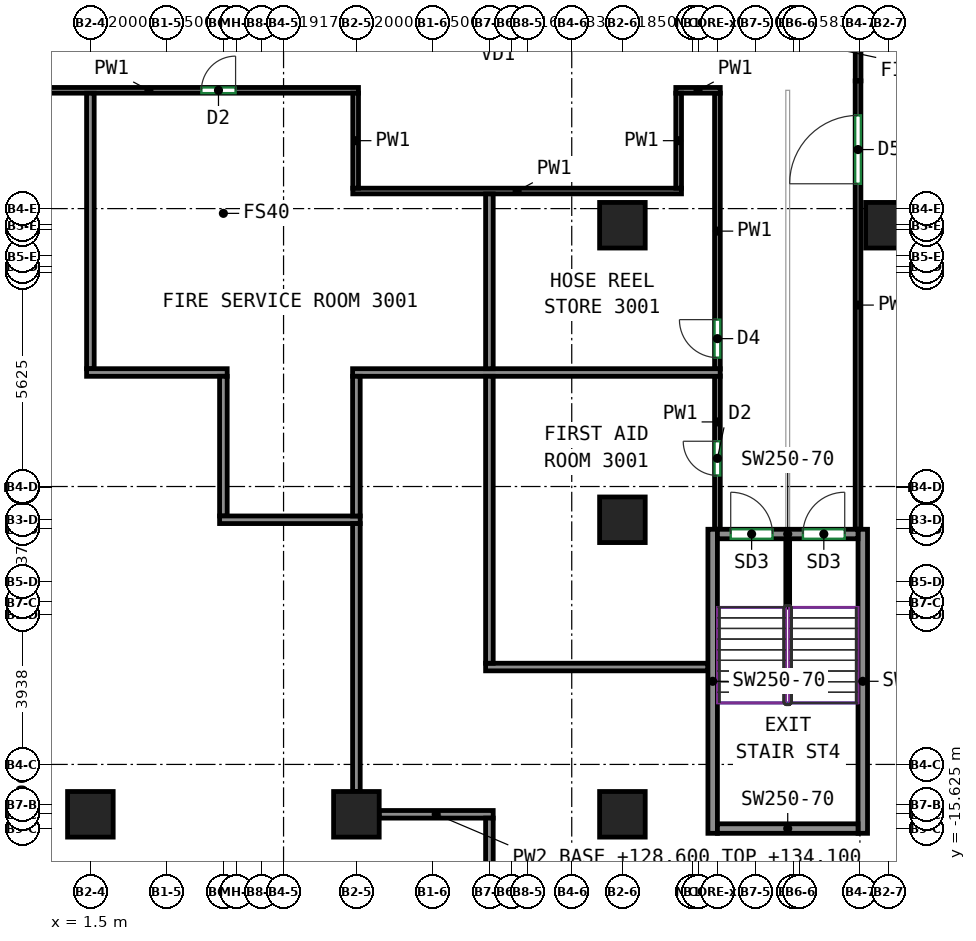
"""IFC4 building model, lengths in metres.
Left out: names, types, materials, properties, quantities, classifications, styles, units other than length and angle.
Written with IfcOpenShell. Run it as: python <this file> out.ifc"""

import sys

from ifc_helpers import new_model, si_unit, direction, frame, frame_2d, origin, origin_2d, place, context, subcontext, project, spatial, rectangle, extrude, source, transform, mapped, element, fill, save


model = new_model("IFC4")
c1 = context("Model", 3, precision=1e-05, world=origin(), true_north=direction((0.0, 1.0)))
c2 = subcontext(c1, "Body", "Model", "MODEL_VIEW")
j1 = project(units=[si_unit("LENGTHUNIT", "METRE"), si_unit("PLANEANGLEUNIT", "RADIAN")], contexts=[c1])
p1 = place(None, origin())
s1 = spatial("IfcSite", under=j1, at=p1, CompositionType="ELEMENT")
p2 = place(p1, origin())
s2 = spatial("IfcBuilding", under=s1, at=p2, CompositionType="ELEMENT")
p3 = place(p2, frame((0.0, 0.0, 128.6)))
s3 = spatial("IfcBuildingStorey", under=s2, at=p3, CompositionType="ELEMENT", Elevation=128.6)
m1 = source(origin(), c2, "Body", "SweptSolid", [
    extrude(rectangle(XDim=1.2, YDim=1.2, at=origin_2d()), origin(), (0.0, 0.0, 1.0), 5.5),
])
for number, where, z_axis, x_axis in (
    (1, (1.5, -15.25, 0.0), (0.0, 0.0, 1.0), (1.0, 0.0, 0.0)),
    (2, (8.5, -15.25, 0.0), (0.0, 0.0, 1.0), (1.0, 0.0, 0.0)),
    (3, (15.5, -15.25, 0.0), (0.0, 0.0, 1.0), (1.0, 0.0, 0.0)),
):
    element("IfcColumn", number, at=place(p3, frame(where, z_axis=z_axis, x_axis=x_axis)), inside=s3, PredefinedType="COLUMN", context=c2, shape_type="MappedRepresentation", body=[
        mapped(m1, transform((0.0, 0.0, 0.0))),
    ])
m2 = source(origin(), c2, "Body", "SweptSolid", [
    extrude(rectangle(XDim=1.2, YDim=1.2, at=origin_2d()), origin(), (0.0, 0.0, 1.0), 9.5),
])
p4 = place(p3, frame((15.5, -7.5, 0.0), z_axis=(0.0, 0.0, 1.0), x_axis=(1.0, 0.0, 0.0)))
e4 = element("IfcColumn", 4, at=p4, inside=s3, PredefinedType="COLUMN", context=c2, shape_type="MappedRepresentation", body=[
    mapped(m2, transform((0.0, 0.0, 0.0))),
])
for number, where, z_axis, x_axis in (
    (5, (15.5, 0.25, 0.0), (0.0, 0.0, 1.0), (1.0, 0.0, 0.0)),
    (6, (22.5, 0.25, 0.0), (0.0, 0.0, 1.0), (1.0, 0.0, 0.0)),
):
    element("IfcColumn", number, at=place(p3, frame(where, z_axis=z_axis, x_axis=x_axis)), inside=s3, PredefinedType="COLUMN", context=c2, shape_type="MappedRepresentation", body=[
        mapped(m1, transform((0.0, 0.0, 0.0))),
    ])
m3 = source(origin(), c2, "Body", "SweptSolid", [
    extrude(rectangle(XDim=8.0, YDim=0.25, at=frame_2d((4.0, 0.0))), origin(), (0.0, 0.0, 1.0), 9.5),
])
for number, where, z_axis, x_axis in (
    (7, (17.875, -15.75, 0.0), (0.0, 0.0, 1.0), (0.0, 1.0, 0.0)),
    (8, (21.825, -15.75, 0.0), (0.0, 0.0, 1.0), (0.0, 1.0, 0.0)),
):
    element("IfcWall", number, at=place(p3, frame(where, z_axis=z_axis, x_axis=x_axis)), inside=s3, PredefinedType="SHEAR", context=c2, shape_type="MappedRepresentation", body=[
        mapped(m3, transform((0.0, 0.0, 0.0))),
    ])
m4 = source(origin(), c2, "Body", "SweptSolid", [
    extrude(rectangle(XDim=3.7, YDim=0.25, at=frame_2d((1.85, 0.0))), origin(), (0.0, 0.0, 1.0), 9.5),
])
p5 = place(p3, frame((18.0, -15.625, 0.0), z_axis=(0.0, 0.0, 1.0), x_axis=(1.0, 0.0, 0.0)))
e9 = element("IfcWall", 9, at=p5, inside=s3, PredefinedType="SHEAR", context=c2, shape_type="MappedRepresentation", body=[
    mapped(m4, transform((0.0, 0.0, 0.0))),
])
p6 = place(p3, frame((18.0, -7.875, 0.0), z_axis=(0.0, 0.0, 1.0), x_axis=(1.0, 0.0, 0.0)))
e10 = element("IfcWall", 10, at=p6, inside=s3, PredefinedType="SHEAR", context=c2, shape_type="MappedRepresentation", body=[
    mapped(m4, transform((0.0, 0.0, 0.0))),
])
p7 = place(p6, frame((2.25, 0.0, 0.0)))
e11 = element("IfcOpeningElement", 11, at=p7, cuts=e10, PredefinedType="OPENING", context=c2, shape_type="SweptSolid", body=[
    extrude(rectangle(XDim=1.1, YDim=2.1, at=frame_2d((0.55, 1.05))), frame((0.0, 0.135, 0.0), z_axis=(0.0, -1.0, 0.0), x_axis=(1.0, 0.0, 0.0)), (0.0, 0.0, 1.0), 0.27),
])
p8 = place(p6, frame((0.35, 0.0, 0.0)))
e12 = element("IfcOpeningElement", 12, at=p8, cuts=e10, PredefinedType="OPENING", context=c2, shape_type="SweptSolid", body=[
    extrude(rectangle(XDim=1.1, YDim=2.1, at=frame_2d((0.55, 1.05))), frame((0.0, 0.135, 0.0), z_axis=(0.0, -1.0, 0.0), x_axis=(1.0, 0.0, 0.0)), (0.0, 0.0, 1.0), 0.27),
])
m5 = source(origin(), c2, "Body", "SweptSolid", [
    extrude(rectangle(XDim=1.8, YDim=0.1, at=frame_2d((0.9, 0.0))), origin(), (0.0, 0.0, 1.0), 3.1),
])
p9 = place(p3, frame((19.85, -9.8, 0.0), z_axis=(0.0, 0.0, 1.0), x_axis=(0.0, 1.0, 0.0)))
e13 = element("IfcWall", 13, at=p9, inside=s3, PredefinedType="PARTITIONING", context=c2, shape_type="MappedRepresentation", body=[
    mapped(m5, transform((0.0, 0.0, 0.0))),
])
p10 = place(p3, frame((-2.475, 3.8, 0.0), z_axis=(0.0, 0.0, 1.0), x_axis=(1.0, 0.0, 0.0)))
e14 = element("IfcWall", 14, at=p10, inside=s3, PredefinedType="PARTITIONING", context=c2, shape_type="SweptSolid", body=[
    extrude(rectangle(XDim=11.03, YDim=0.15, at=frame_2d((5.515, 0.0))), origin(), (0.0, 0.0, 1.0), 9.5),
])
p11 = place(p10, frame((6.896, 0.0, 0.0)))
e15 = element("IfcOpeningElement", 15, at=p11, cuts=e14, PredefinedType="OPENING", context=c2, shape_type="SweptSolid", body=[
    extrude(rectangle(XDim=0.9, YDim=2.1, at=frame_2d((0.45, 1.05))), frame((0.0, 0.085, 0.0), z_axis=(0.0, -1.0, 0.0), x_axis=(1.0, 0.0, 0.0)), (0.0, 0.0, 1.0), 0.17),
])
p12 = place(p3, frame((8.405, 1.15, 0.0), z_axis=(0.0, 0.0, 1.0), x_axis=(1.0, 0.0, 0.0)))
e16 = element("IfcWall", 16, at=p12, inside=s3, PredefinedType="PARTITIONING", context=c2, shape_type="SweptSolid", body=[
    extrude(rectangle(XDim=8.65, YDim=0.15, at=frame_2d((4.325, 0.0))), origin(), (0.0, 0.0, 1.0), 9.5),
])
p13 = place(p3, frame((8.48, 3.725, 0.0), z_axis=(0.0, 0.0, 1.0), x_axis=(0.0, -1.0, 0.0)))
e17 = element("IfcWall", 17, at=p13, inside=s3, PredefinedType="PARTITIONING", context=c2, shape_type="SweptSolid", body=[
    extrude(rectangle(XDim=2.5, YDim=0.15, at=frame_2d((1.25, 0.0))), origin(), (0.0, 0.0, 1.0), 9.5),
])
p14 = place(p3, frame((18.0, -7.75, 0.0), z_axis=(0.0, 0.0, 1.0), x_axis=(0.0, 1.0, 0.0)))
e18 = element("IfcWall", 18, at=p14, inside=s3, PredefinedType="PARTITIONING", context=c2, shape_type="SweptSolid", body=[
    extrude(rectangle(XDim=4.035, YDim=0.15, at=frame_2d((2.018, 0.0))), origin(), (0.0, 0.0, 1.0), 9.5),
])
p15 = place(p14, frame((1.416, 0.0, 0.0)))
e19 = element("IfcOpeningElement", 19, at=p15, cuts=e18, PredefinedType="OPENING", context=c2, shape_type="SweptSolid", body=[
    extrude(rectangle(XDim=0.9, YDim=2.1, at=frame_2d((0.45, 1.05))), frame((0.0, 0.085, 0.0), z_axis=(0.0, -1.0, 0.0), x_axis=(1.0, 0.0, 0.0)), (0.0, 0.0, 1.0), 0.17),
])
p16 = place(p3, frame((21.702, 4.048, 0.0), z_axis=(0.0, 0.0, 1.0), x_axis=(0.0, 1.0, 0.0)))
e20 = element("IfcWall", 20, at=p16, inside=s3, PredefinedType="PARTITIONING", context=c2, shape_type="SweptSolid", body=[
    extrude(rectangle(XDim=3.789, YDim=0.15, at=frame_2d((1.895, 0.0))), origin(), (0.0, 0.0, 1.0), 9.5),
])
p17 = place(p3, frame((21.7, -7.75, 0.0), z_axis=(0.0, 0.0, 1.0), x_axis=(0.0, 1.0, 0.0)))
e21 = element("IfcWall", 21, at=p17, inside=s3, PredefinedType="PARTITIONING", context=c2, shape_type="SweptSolid", body=[
    extrude(rectangle(XDim=11.798, YDim=0.15, at=frame_2d((5.899, 0.0))), origin(), (0.0, 0.0, 1.0), 7.5),
])
p18 = place(p17, frame((9.091, 0.0, 0.0)))
e22 = element("IfcOpeningElement", 22, at=p18, cuts=e21, PredefinedType="OPENING", context=c2, shape_type="SweptSolid", body=[
    extrude(rectangle(XDim=1.8, YDim=2.1, at=frame_2d((0.9, 1.05))), frame((0.0, 0.085, 0.0), z_axis=(0.0, -1.0, 0.0), x_axis=(1.0, 0.0, 0.0)), (0.0, 0.0, 1.0), 0.17),
])
p19 = place(p3, frame((18.0, -3.535, 0.0), z_axis=(0.0, 0.0, 1.0), x_axis=(0.0, 1.0, 0.0)))
e23 = element("IfcWall", 23, at=p19, inside=s3, PredefinedType="PARTITIONING", context=c2, shape_type="SweptSolid", body=[
    extrude(rectangle(XDim=7.26, YDim=0.15, at=frame_2d((3.63, 0.0))), origin(), (0.0, 0.0, 1.0), 9.5),
])
p20 = place(p19, frame((0.301, 0.0, 0.0)))
e24 = element("IfcOpeningElement", 24, at=p20, cuts=e23, PredefinedType="OPENING", context=c2, shape_type="SweptSolid", body=[
    extrude(rectangle(XDim=1.0, YDim=2.1, at=frame_2d((0.5, 1.05))), frame((0.0, 0.085, 0.0), z_axis=(0.0, -1.0, 0.0), x_axis=(1.0, 0.0, 0.0)), (0.0, 0.0, 1.0), 0.17),
])
p21 = place(p3, frame((16.905, 3.8, 0.0), z_axis=(0.0, 0.0, 1.0), x_axis=(1.0, 0.0, 0.0)))
e25 = element("IfcWall", 25, at=p21, inside=s3, PredefinedType="PARTITIONING", context=c2, shape_type="SweptSolid", body=[
    extrude(rectangle(XDim=1.17, YDim=0.15, at=frame_2d((0.585, 0.0))), origin(), (0.0, 0.0, 1.0), 9.5),
])
p22 = place(p3, frame((16.98, 1.225, 0.0), z_axis=(0.0, 0.0, 1.0), x_axis=(0.0, 1.0, 0.0)))
e26 = element("IfcWall", 26, at=p22, inside=s3, PredefinedType="PARTITIONING", context=c2, shape_type="SweptSolid", body=[
    extrude(rectangle(XDim=2.5, YDim=0.15, at=frame_2d((1.25, 0.0))), origin(), (0.0, 0.0, 1.0), 9.5),
])
p23 = place(p3, frame((1.5, -3.525, 0.0), z_axis=(0.0, 0.0, 1.0), x_axis=(0.0, 1.0, 0.0)))
e27 = element("IfcWall", 27, at=p23, inside=s3, PredefinedType="PARTITIONING", context=c2, shape_type="SweptSolid", body=[
    extrude(rectangle(XDim=7.248, YDim=0.2, at=frame_2d((3.624, 0.0))), origin(), (0.0, 0.0, 1.0), 9.5),
])
p24 = place(p3, frame((1.4, -3.625, 0.0), z_axis=(0.0, 0.0, 1.0), x_axis=(1.0, 0.0, 0.0)))
e28 = element("IfcWall", 28, at=p24, inside=s3, PredefinedType="PARTITIONING", context=c2, shape_type="SweptSolid", body=[
    extrude(rectangle(XDim=3.7, YDim=0.2, at=frame_2d((1.85, 0.0))), origin(), (0.0, 0.0, 1.0), 9.5),
])
p25 = place(p3, frame((5.0, -7.4, 0.0), z_axis=(0.0, 0.0, 1.0), x_axis=(0.0, 1.0, 0.0)))
e29 = element("IfcWall", 29, at=p25, inside=s3, PredefinedType="PARTITIONING", context=c2, shape_type="SweptSolid", body=[
    extrude(rectangle(XDim=3.675, YDim=0.2, at=frame_2d((1.837, 0.0))), origin(), (0.0, 0.0, 1.0), 9.5),
])
p26 = place(p3, frame((8.6, -7.5, 0.0), z_axis=(0.0, 0.0, 1.0), x_axis=(-1.0, 0.0, 0.0)))
e30 = element("IfcWall", 30, at=p26, inside=s3, PredefinedType="PARTITIONING", context=c2, shape_type="SweptSolid", body=[
    extrude(rectangle(XDim=3.7, YDim=0.2, at=frame_2d((1.85, 0.0))), origin(), (0.0, 0.0, 1.0), 9.5),
])
p27 = place(p3, frame((8.5, -14.65, 0.0), z_axis=(0.0, 0.0, 1.0), x_axis=(0.0, 1.0, 0.0)))
e31 = element("IfcWall", 31, at=p27, inside=s3, PredefinedType="PARTITIONING", context=c2, shape_type="SweptSolid", body=[
    extrude(rectangle(XDim=7.05, YDim=0.2, at=frame_2d((3.525, 0.0))), origin(), (0.0, 0.0, 1.0), 9.5),
])
p28 = place(p3, frame((12.1, -15.25, 0.0), z_axis=(0.0, 0.0, 1.0), x_axis=(-1.0, 0.0, 0.0)))
e32 = element("IfcWall", 32, at=p28, inside=s3, PredefinedType="PARTITIONING", context=c2, shape_type="SweptSolid", body=[
    extrude(rectangle(XDim=3.0, YDim=0.2, at=frame_2d((1.5, 0.0))), origin(), (0.0, 0.0, 1.0), 5.5),
])
p29 = place(p3, frame((12.0, -22.75, 0.0), z_axis=(0.0, 0.0, 1.0), x_axis=(0.0, 1.0, 0.0)))
e33 = element("IfcWall", 33, at=p29, inside=s3, PredefinedType="PARTITIONING", context=c2, shape_type="SweptSolid", body=[
    extrude(rectangle(XDim=7.4, YDim=0.2, at=frame_2d((3.7, 0.0))), origin(), (0.0, 0.0, 1.0), 9.5),
])
p30 = place(p3, frame((8.4, -3.625, 0.0), z_axis=(0.0, 0.0, 1.0), x_axis=(1.0, 0.0, 0.0)))
e34 = element("IfcWall", 34, at=p30, inside=s3, PredefinedType="PARTITIONING", context=c2, shape_type="SweptSolid", body=[
    extrude(rectangle(XDim=9.673, YDim=0.2, at=frame_2d((4.836, 0.0))), origin(), (0.0, 0.0, 1.0), 9.5),
])
p31 = place(p3, frame((8.5, -7.4, 0.0), z_axis=(0.0, 0.0, 1.0), x_axis=(0.0, 1.0, 0.0)))
e35 = element("IfcWall", 35, at=p31, inside=s3, PredefinedType="PARTITIONING", context=c2, shape_type="SweptSolid", body=[
    extrude(rectangle(XDim=3.675, YDim=0.2, at=frame_2d((1.837, 0.0))), origin(), (0.0, 0.0, 1.0), 9.5),
])
p32 = place(p3, frame((12.0, -3.525, 0.0), z_axis=(0.0, 0.0, 1.0), x_axis=(0.0, 1.0, 0.0)))
e36 = element("IfcWall", 36, at=p32, inside=s3, PredefinedType="PARTITIONING", context=c2, shape_type="SweptSolid", body=[
    extrude(rectangle(XDim=4.598, YDim=0.2, at=frame_2d((2.299, 0.0))), origin(), (0.0, 0.0, 1.0), 9.5),
])
p33 = place(p3, frame((11.9, -11.375, 0.0), z_axis=(0.0, 0.0, 1.0), x_axis=(1.0, 0.0, 0.0)))
e37 = element("IfcWall", 37, at=p33, inside=s3, PredefinedType="PARTITIONING", context=c2, shape_type="SweptSolid", body=[
    extrude(rectangle(XDim=5.85, YDim=0.2, at=frame_2d((2.925, 0.0))), origin(), (0.0, 0.0, 1.0), 9.5),
])
p34 = place(p3, frame((12.0, -11.275, 0.0), z_axis=(0.0, 0.0, 1.0), x_axis=(0.0, 1.0, 0.0)))
e38 = element("IfcWall", 38, at=p34, inside=s3, PredefinedType="PARTITIONING", context=c2, shape_type="SweptSolid", body=[
    extrude(rectangle(XDim=7.55, YDim=0.2, at=frame_2d((3.775, 0.0))), origin(), (0.0, 0.0, 1.0), 9.5),
])
p35 = place(p7, origin())
e39 = element("IfcDoor", 39, at=p35, inside=s3, OperationType="SINGLE_SWING_RIGHT", PredefinedType="DOOR", context=c2, shape_type="SweptSolid", body=[
    extrude(rectangle(XDim=1.1, YDim=2.1, at=frame_2d((0.55, 1.05))), frame((0.0, 0.025, 0.0), z_axis=(0.0, -1.0, 0.0), x_axis=(1.0, 0.0, 0.0)), (0.0, 0.0, 1.0), 0.05),
])
fill(e11, e39)
p36 = place(p8, origin())
e40 = element("IfcDoor", 40, at=p36, inside=s3, OperationType="SINGLE_SWING_LEFT", PredefinedType="DOOR", context=c2, shape_type="SweptSolid", body=[
    extrude(rectangle(XDim=1.1, YDim=2.1, at=frame_2d((0.55, 1.05))), frame((0.0, 0.025, 0.0), z_axis=(0.0, -1.0, 0.0), x_axis=(1.0, 0.0, 0.0)), (0.0, 0.0, 1.0), 0.05),
])
fill(e12, e40)
p37 = place(p15, origin())
e41 = element("IfcDoor", 41, at=p37, inside=s3, OperationType="SINGLE_SWING_RIGHT", PredefinedType="DOOR", context=c2, shape_type="SweptSolid", body=[
    extrude(rectangle(XDim=0.9, YDim=2.1, at=frame_2d((0.45, 1.05))), frame((0.0, 0.025, 0.0), z_axis=(0.0, -1.0, 0.0), x_axis=(1.0, 0.0, 0.0)), (0.0, 0.0, 1.0), 0.05),
])
fill(e19, e41)
p38 = place(p20, origin())
e42 = element("IfcDoor", 42, at=p38, inside=s3, OperationType="SINGLE_SWING_RIGHT", PredefinedType="DOOR", context=c2, shape_type="SweptSolid", body=[
    extrude(rectangle(XDim=1.0, YDim=2.1, at=frame_2d((0.5, 1.05))), frame((0.0, 0.025, 0.0), z_axis=(0.0, -1.0, 0.0), x_axis=(1.0, 0.0, 0.0)), (0.0, 0.0, 1.0), 0.05),
])
fill(e24, e42)
p39 = place(p18, origin())
e43 = element("IfcDoor", 43, at=p39, inside=s3, OperationType="DOUBLE_DOOR_SINGLE_SWING", PredefinedType="DOOR", context=c2, shape_type="SweptSolid", body=[
    extrude(rectangle(XDim=1.8, YDim=2.1, at=frame_2d((0.9, 1.05))), frame((0.0, 0.025, 0.0), z_axis=(0.0, -1.0, 0.0), x_axis=(1.0, 0.0, 0.0)), (0.0, 0.0, 1.0), 0.05),
])
fill(e22, e43)
p40 = place(p11, origin())
e44 = element("IfcDoor", 44, at=p40, inside=s3, OperationType="SINGLE_SWING_RIGHT", PredefinedType="DOOR", context=c2, shape_type="SweptSolid", body=[
    extrude(rectangle(XDim=0.9, YDim=2.1, at=frame_2d((0.45, 1.05))), frame((0.0, 0.025, 0.0), z_axis=(0.0, -1.0, 0.0), x_axis=(1.0, 0.0, 0.0)), (0.0, 0.0, 1.0), 0.05),
])
fill(e15, e44)
save(model, sys.argv[1])
